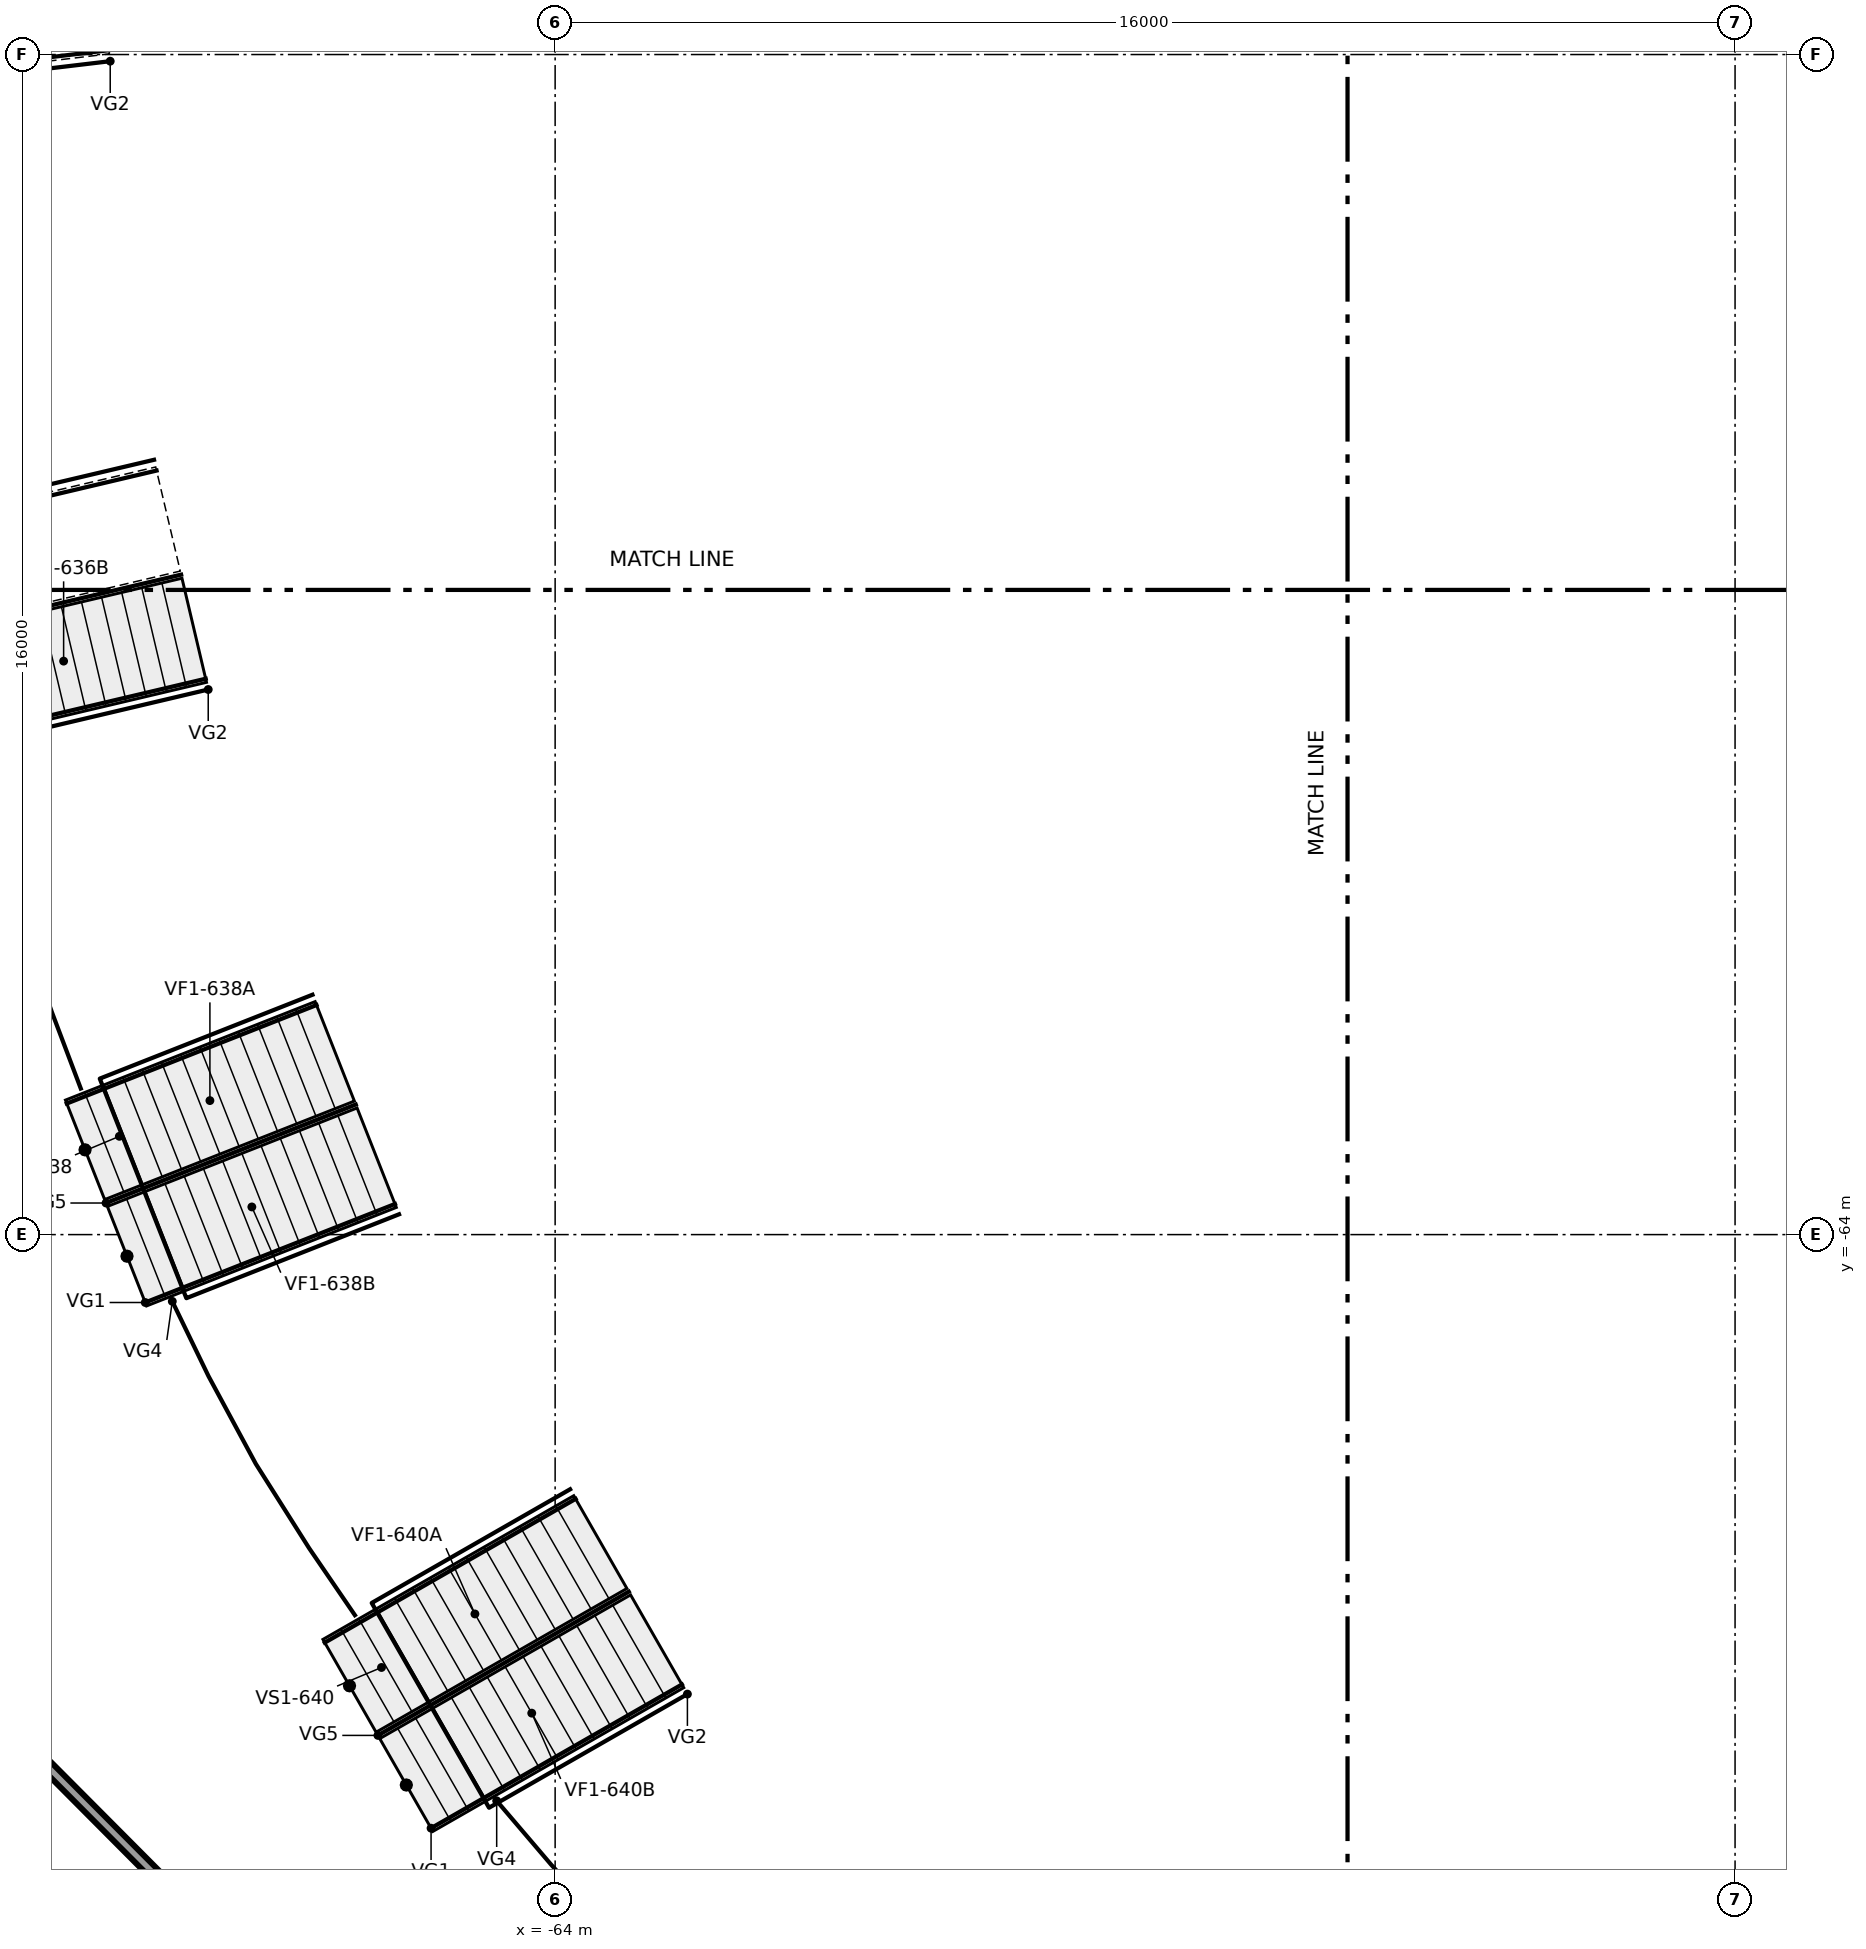
"""IFC4 building model, lengths in metres.
Left out: names, types, materials, properties, quantities, classifications, styles, units other than length and angle.
Written with IfcOpenShell. Run it as: python <this file> out.ifc"""

import sys

from ifc_helpers import new_model, si_unit, direction, frame, frame_2d, origin, origin_2d, place, context, subcontext, project, spatial, rectangle, circle, extrude, element, save


model = new_model("IFC4")
c1 = context("Model", 3, precision=1e-05, world=origin(), true_north=direction((0.0, 1.0)))
c2 = subcontext(c1, "Body", "Model", "MODEL_VIEW")
j1 = project(units=[si_unit("LENGTHUNIT", "METRE"), si_unit("PLANEANGLEUNIT", "RADIAN")], contexts=[c1])
p1 = place(None, origin())
s1 = spatial("IfcSite", under=j1, at=p1, CompositionType="ELEMENT")
p2 = place(p1, origin())
s2 = spatial("IfcBuilding", under=s1, at=p2, CompositionType="ELEMENT")
p3 = place(p2, frame((0.0, 0.0, 18.0)))
s3 = spatial("IfcBuildingStorey", under=s2, at=p3, CompositionType="ELEMENT", Elevation=18.0)
p4 = place(p3, frame((-71.17, -59.677, 0.0), z_axis=(0.0, 0.0, 1.0), x_axis=(1.0, 0.0, 0.0)))
e1 = element("IfcColumn", 1, at=p4, inside=s3, PredefinedType="COLUMN", context=c2, shape_type="SweptSolid", body=[
    extrude(circle(Radius=0.45, at=origin_2d()), origin(), (0.0, 0.0, 1.0), 3.698),
])
p5 = place(p3, frame((-67.972, -67.058, 0.0), z_axis=(0.0, 0.0, 1.0), x_axis=(1.0, 0.0, 0.0)))
e2 = element("IfcColumn", 2, at=p5, inside=s3, PredefinedType="COLUMN", context=c2, shape_type="SweptSolid", body=[
    extrude(circle(Radius=0.45, at=origin_2d()), origin(), (0.0, 0.0, 1.0), 3.954),
])
p6 = place(p3, frame((-64.152, -77.974, 0.0), z_axis=(0.0, 0.0, 1.0), x_axis=(-0.705496399325, 0.70871350385, 0.0)))
e3 = element("IfcWall", 3, at=p6, inside=s3, PredefinedType="PARTITIONING", context=c2, shape_type="SweptSolid", body=[
    extrude(rectangle(XDim=13.356, YDim=0.15, at=frame_2d((6.678, 0.0))), origin(), (0.0, 0.0, 1.0), 5.6),
])
p7 = place(p6, frame((4.85, 0.0, 0.0)))
e4 = element("IfcOpeningElement", 4, at=p7, cuts=e3, PredefinedType="OPENING", context=c2, shape_type="SweptSolid", body=[
    extrude(rectangle(XDim=1.8, YDim=2.1, at=frame_2d((0.9, 1.05))), frame((0.0, 0.085, 0.0), z_axis=(0.0, -1.0, 0.0), x_axis=(1.0, 0.0, 0.0)), (0.0, 0.0, 1.0), 0.17),
])
p8 = place(p6, frame((11.45, 0.0, 0.0)))
e5 = element("IfcOpeningElement", 5, at=p8, cuts=e3, PredefinedType="OPENING", context=c2, shape_type="SweptSolid", body=[
    extrude(rectangle(XDim=1.8, YDim=2.1, at=frame_2d((0.9, 1.05))), frame((0.0, 0.085, 0.0), z_axis=(0.0, -1.0, 0.0), x_axis=(1.0, 0.0, 0.0)), (0.0, 0.0, 1.0), 0.17),
])
save(model, sys.argv[1])
